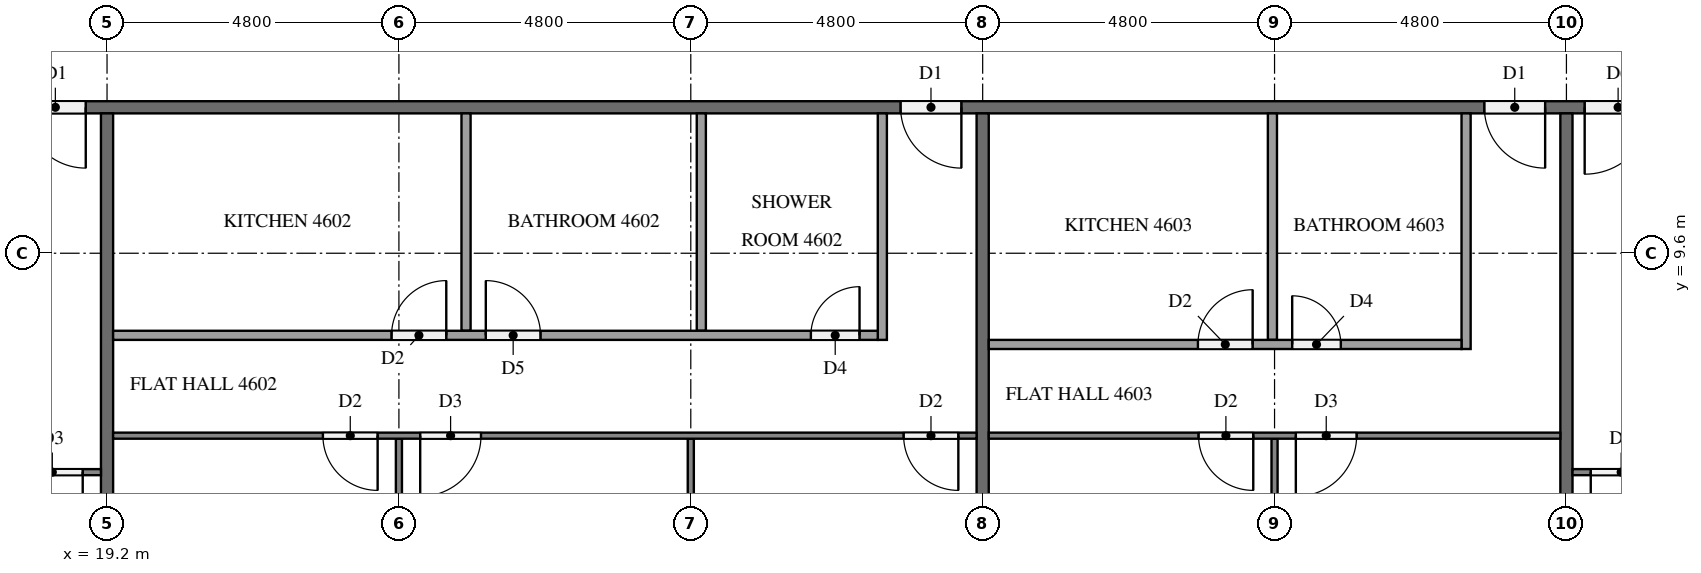
"""IFC4 building model, lengths in metres.
Left out: names, types, materials, properties, quantities, classifications, styles, units other than length and angle.
Written with IfcOpenShell. Run it as: python <this file> out.ifc"""

import sys

from ifc_helpers import new_model, si_unit, direction, frame, frame_2d, origin, place, context, subcontext, project, spatial, rectangle, extrude, element, fill, save


model = new_model("IFC4")
c1 = context("Model", 3, precision=1e-05, world=origin(), true_north=direction((0.0, 1.0)))
c2 = subcontext(c1, "Body", "Model", "MODEL_VIEW")
j1 = project(units=[si_unit("LENGTHUNIT", "METRE"), si_unit("PLANEANGLEUNIT", "RADIAN")], contexts=[c1])
p1 = place(None, origin())
s1 = spatial("IfcSite", under=j1, at=p1, CompositionType="ELEMENT")
p2 = place(p1, origin())
s2 = spatial("IfcBuilding", under=s1, at=p2, CompositionType="ELEMENT")
p3 = place(p2, frame((0.0, 0.0, 178.9)))
s3 = spatial("IfcBuildingStorey", under=s2, at=p3, CompositionType="ELEMENT", Elevation=178.9)
p4 = place(p3, frame((50.5, 12.0, 0.0), z_axis=(0.0, 0.0, 1.0), x_axis=(-1.0, 0.0, 0.0)))
e1 = element("IfcWall", 1, at=p4, inside=s3, PredefinedType="PARTITIONING", context=c2, shape_type="SweptSolid", body=[
    extrude(rectangle(XDim=38.6, YDim=0.2, at=frame_2d((19.3, 0.0))), origin(), (0.0, 0.0, 1.0), 3.2),
])
p5 = place(p4, frame((31.65, 0.0, 0.0)))
e2 = element("IfcOpeningElement", 2, at=p5, cuts=e1, PredefinedType="OPENING", context=c2, shape_type="SweptSolid", body=[
    extrude(rectangle(XDim=1.0, YDim=2.1, at=frame_2d((0.5, 1.05))), frame((0.0, 0.11, 0.0), z_axis=(0.0, -1.0, 0.0), x_axis=(1.0, 0.0, 0.0)), (0.0, 0.0, 1.0), 0.22),
])
p6 = place(p4, frame((17.25, 0.0, 0.0)))
e3 = element("IfcOpeningElement", 3, at=p6, cuts=e1, PredefinedType="OPENING", context=c2, shape_type="SweptSolid", body=[
    extrude(rectangle(XDim=1.0, YDim=2.1, at=frame_2d((0.5, 1.05))), frame((0.0, 0.11, 0.0), z_axis=(0.0, -1.0, 0.0), x_axis=(1.0, 0.0, 0.0)), (0.0, 0.0, 1.0), 0.22),
])
p7 = place(p4, frame((7.65, 0.0, 0.0)))
e4 = element("IfcOpeningElement", 4, at=p7, cuts=e1, PredefinedType="OPENING", context=c2, shape_type="SweptSolid", body=[
    extrude(rectangle(XDim=1.0, YDim=2.1, at=frame_2d((0.5, 1.05))), frame((0.0, 0.11, 0.0), z_axis=(0.0, -1.0, 0.0), x_axis=(1.0, 0.0, 0.0)), (0.0, 0.0, 1.0), 0.22),
])
p8 = place(p4, frame((5.9, 0.0, 0.0)))
e5 = element("IfcOpeningElement", 5, at=p8, cuts=e1, PredefinedType="OPENING", context=c2, shape_type="SweptSolid", body=[
    extrude(rectangle(XDim=1.1, YDim=2.1, at=frame_2d((0.55, 1.05))), frame((0.0, 0.11, 0.0), z_axis=(0.0, -1.0, 0.0), x_axis=(1.0, 0.0, 0.0)), (0.0, 0.0, 1.0), 0.22),
])
p9 = place(p3, frame((19.2, 11.9, 0.0), z_axis=(0.0, 0.0, 1.0), x_axis=(0.0, -1.0, 0.0)))
e6 = element("IfcWall", 6, at=p9, inside=s3, PredefinedType="PARTITIONING", context=c2, shape_type="SweptSolid", body=[
    extrude(rectangle(XDim=11.575, YDim=0.2, at=frame_2d((5.788, 0.0))), origin(), (0.0, 0.0, 1.0), 3.2),
])
for number, where, z_axis, x_axis in (
    (7, (33.6, 11.9, 0.0), (0.0, 0.0, 1.0), (0.0, -1.0, 0.0)),
    (8, (43.2, 11.9, 0.0), (0.0, 0.0, 1.0), (0.0, -1.0, 0.0)),
):
    element("IfcWall", number, at=place(p3, frame(where, z_axis=z_axis, x_axis=x_axis)), inside=s3, PredefinedType="PARTITIONING", context=c2, shape_type="SweptSolid", body=[
        extrude(rectangle(XDim=11.8, YDim=0.2, at=frame_2d((5.9, 0.0))), origin(), (0.0, 0.0, 1.0), 3.2),
    ])
p10 = place(p3, frame((19.1, 6.0, 0.0), z_axis=(0.0, 0.0, 1.0), x_axis=(-1.0, 0.0, 0.0)))
e9 = element("IfcWall", 9, at=p10, inside=s3, PredefinedType="PARTITIONING", context=c2, shape_type="SweptSolid", body=[
    extrude(rectangle(XDim=14.2, YDim=0.1, at=frame_2d((7.1, 0.0))), origin(), (0.0, 0.0, 1.0), 3.2),
])
p11 = place(p10, frame((0.3, 0.0, 0.0)))
e10 = element("IfcOpeningElement", 10, at=p11, cuts=e9, PredefinedType="OPENING", context=c2, shape_type="SweptSolid", body=[
    extrude(rectangle(XDim=1.0, YDim=2.1, at=frame_2d((0.5, 1.05))), frame((0.0, 0.06, 0.0), z_axis=(0.0, -1.0, 0.0), x_axis=(1.0, 0.0, 0.0)), (0.0, 0.0, 1.0), 0.12),
])
p12 = place(p10, frame((8.25, 0.0, 0.0)))
e11 = element("IfcOpeningElement", 11, at=p12, cuts=e9, PredefinedType="OPENING", context=c2, shape_type="SweptSolid", body=[
    extrude(rectangle(XDim=0.9, YDim=2.1, at=frame_2d((0.45, 1.05))), frame((0.0, 0.06, 0.0), z_axis=(0.0, -1.0, 0.0), x_axis=(1.0, 0.0, 0.0)), (0.0, 0.0, 1.0), 0.12),
])
p13 = place(p10, frame((9.85, 0.0, 0.0)))
e12 = element("IfcOpeningElement", 12, at=p13, cuts=e9, PredefinedType="OPENING", context=c2, shape_type="SweptSolid", body=[
    extrude(rectangle(XDim=0.9, YDim=2.1, at=frame_2d((0.45, 1.05))), frame((0.0, 0.06, 0.0), z_axis=(0.0, -1.0, 0.0), x_axis=(1.0, 0.0, 0.0)), (0.0, 0.0, 1.0), 0.12),
])
p14 = place(p3, frame((28.8, 6.55, 0.0), z_axis=(0.0, 0.0, 1.0), x_axis=(0.0, -1.0, 0.0)))
e13 = element("IfcWall", 13, at=p14, inside=s3, PredefinedType="PARTITIONING", context=c2, shape_type="SweptSolid", body=[
    extrude(rectangle(XDim=6.225, YDim=0.1, at=frame_2d((3.113, 0.0))), origin(), (0.0, 0.0, 1.0), 3.2),
])
p15 = place(p3, frame((24.0, 6.55, 0.0), z_axis=(0.0, 0.0, 1.0), x_axis=(0.0, -1.0, 0.0)))
e14 = element("IfcWall", 14, at=p15, inside=s3, PredefinedType="PARTITIONING", context=c2, shape_type="SweptSolid", body=[
    extrude(rectangle(XDim=6.45, YDim=0.1, at=frame_2d((3.225, 0.0))), origin(), (0.0, 0.0, 1.0), 3.2),
])
p16 = place(p3, frame((33.5, 6.6, 0.0), z_axis=(0.0, 0.0, 1.0), x_axis=(-1.0, 0.0, 0.0)))
e15 = element("IfcWall", 15, at=p16, inside=s3, PredefinedType="PARTITIONING", context=c2, shape_type="SweptSolid", body=[
    extrude(rectangle(XDim=14.2, YDim=0.1, at=frame_2d((7.1, 0.0))), origin(), (0.0, 0.0, 1.0), 3.2),
])
p17 = place(p16, frame((0.3, 0.0, 0.0)))
e16 = element("IfcOpeningElement", 16, at=p17, cuts=e15, PredefinedType="OPENING", context=c2, shape_type="SweptSolid", body=[
    extrude(rectangle(XDim=0.9, YDim=2.1, at=frame_2d((0.45, 1.05))), frame((0.0, 0.06, 0.0), z_axis=(0.0, -1.0, 0.0), x_axis=(1.0, 0.0, 0.0)), (0.0, 0.0, 1.0), 0.12),
])
p18 = place(p16, frame((8.15, 0.0, 0.0)))
e17 = element("IfcOpeningElement", 17, at=p18, cuts=e15, PredefinedType="OPENING", context=c2, shape_type="SweptSolid", body=[
    extrude(rectangle(XDim=1.0, YDim=2.1, at=frame_2d((0.5, 1.05))), frame((0.0, 0.06, 0.0), z_axis=(0.0, -1.0, 0.0), x_axis=(1.0, 0.0, 0.0)), (0.0, 0.0, 1.0), 0.12),
])
p19 = place(p16, frame((9.85, 0.0, 0.0)))
e18 = element("IfcOpeningElement", 18, at=p19, cuts=e15, PredefinedType="OPENING", context=c2, shape_type="SweptSolid", body=[
    extrude(rectangle(XDim=0.9, YDim=2.1, at=frame_2d((0.45, 1.05))), frame((0.0, 0.06, 0.0), z_axis=(0.0, -1.0, 0.0), x_axis=(1.0, 0.0, 0.0)), (0.0, 0.0, 1.0), 0.12),
])
for number, where, z_axis, x_axis in (
    (19, (28.973, 11.9, 0.0), (0.0, 0.0, 1.0), (0.0, -1.0, 0.0)),
    (20, (25.104, 11.9, 0.0), (0.0, 0.0, 1.0), (0.0, -1.0, 0.0)),
):
    element("IfcWall", number, at=place(p3, frame(where, z_axis=z_axis, x_axis=x_axis)), inside=s3, PredefinedType="PARTITIONING", context=c2, shape_type="SweptSolid", body=[
        extrude(rectangle(XDim=3.575, YDim=0.15, at=frame_2d((1.788, 0.0))), origin(), (0.0, 0.0, 1.0), 3.2),
    ])
p20 = place(p3, frame((31.95, 11.9, 0.0), z_axis=(0.0, 0.0, 1.0), x_axis=(0.0, -1.0, 0.0)))
e21 = element("IfcWall", 21, at=p20, inside=s3, PredefinedType="PARTITIONING", context=c2, shape_type="SweptSolid", body=[
    extrude(rectangle(XDim=3.725, YDim=0.15, at=frame_2d((1.862, 0.0))), origin(), (0.0, 0.0, 1.0), 3.2),
])
p21 = place(p3, frame((19.3, 8.25, 0.0), z_axis=(0.0, 0.0, 1.0), x_axis=(1.0, 0.0, 0.0)))
e22 = element("IfcWall", 22, at=p21, inside=s3, PredefinedType="PARTITIONING", context=c2, shape_type="SweptSolid", body=[
    extrude(rectangle(XDim=12.575, YDim=0.15, at=frame_2d((6.288, 0.0))), origin(), (0.0, 0.0, 1.0), 3.2),
])
p22 = place(p21, frame((11.475, 0.0, 0.0)))
e23 = element("IfcOpeningElement", 23, at=p22, cuts=e22, PredefinedType="OPENING", context=c2, shape_type="SweptSolid", body=[
    extrude(rectangle(XDim=0.8, YDim=2.1, at=frame_2d((0.4, 1.05))), frame((0.0, 0.085, 0.0), z_axis=(0.0, -1.0, 0.0), x_axis=(1.0, 0.0, 0.0)), (0.0, 0.0, 1.0), 0.17),
])
p23 = place(p21, frame((6.129, 0.0, 0.0)))
e24 = element("IfcOpeningElement", 24, at=p23, cuts=e22, PredefinedType="OPENING", context=c2, shape_type="SweptSolid", body=[
    extrude(rectangle(XDim=0.9, YDim=2.1, at=frame_2d((0.45, 1.05))), frame((0.0, 0.085, 0.0), z_axis=(0.0, -1.0, 0.0), x_axis=(1.0, 0.0, 0.0)), (0.0, 0.0, 1.0), 0.17),
])
p24 = place(p21, frame((4.579, 0.0, 0.0)))
e25 = element("IfcOpeningElement", 25, at=p24, cuts=e22, PredefinedType="OPENING", context=c2, shape_type="SweptSolid", body=[
    extrude(rectangle(XDim=0.9, YDim=2.1, at=frame_2d((0.45, 1.05))), frame((0.0, 0.085, 0.0), z_axis=(0.0, -1.0, 0.0), x_axis=(1.0, 0.0, 0.0)), (0.0, 0.0, 1.0), 0.17),
])
p25 = place(p3, frame((38.4, 6.55, 0.0), z_axis=(0.0, 0.0, 1.0), x_axis=(0.0, -1.0, 0.0)))
e26 = element("IfcWall", 26, at=p25, inside=s3, PredefinedType="PARTITIONING", context=c2, shape_type="SweptSolid", body=[
    extrude(rectangle(XDim=6.225, YDim=0.1, at=frame_2d((3.113, 0.0))), origin(), (0.0, 0.0, 1.0), 3.2),
])
p26 = place(p3, frame((43.1, 6.6, 0.0), z_axis=(0.0, 0.0, 1.0), x_axis=(-1.0, 0.0, 0.0)))
e27 = element("IfcWall", 27, at=p26, inside=s3, PredefinedType="PARTITIONING", context=c2, shape_type="SweptSolid", body=[
    extrude(rectangle(XDim=9.4, YDim=0.1, at=frame_2d((4.7, 0.0))), origin(), (0.0, 0.0, 1.0), 3.2),
])
p27 = place(p26, frame((3.35, 0.0, 0.0)))
e28 = element("IfcOpeningElement", 28, at=p27, cuts=e27, PredefinedType="OPENING", context=c2, shape_type="SweptSolid", body=[
    extrude(rectangle(XDim=1.0, YDim=2.1, at=frame_2d((0.5, 1.05))), frame((0.0, 0.06, 0.0), z_axis=(0.0, -1.0, 0.0), x_axis=(1.0, 0.0, 0.0)), (0.0, 0.0, 1.0), 0.12),
])
p28 = place(p26, frame((5.05, 0.0, 0.0)))
e29 = element("IfcOpeningElement", 29, at=p28, cuts=e27, PredefinedType="OPENING", context=c2, shape_type="SweptSolid", body=[
    extrude(rectangle(XDim=0.9, YDim=2.1, at=frame_2d((0.45, 1.05))), frame((0.0, 0.06, 0.0), z_axis=(0.0, -1.0, 0.0), x_axis=(1.0, 0.0, 0.0)), (0.0, 0.0, 1.0), 0.12),
])
p29 = place(p3, frame((38.365, 11.9, 0.0), z_axis=(0.0, 0.0, 1.0), x_axis=(0.0, -1.0, 0.0)))
e30 = element("IfcWall", 30, at=p29, inside=s3, PredefinedType="PARTITIONING", context=c2, shape_type="SweptSolid", body=[
    extrude(rectangle(XDim=3.725, YDim=0.15, at=frame_2d((1.862, 0.0))), origin(), (0.0, 0.0, 1.0), 3.2),
])
p30 = place(p3, frame((41.55, 11.9, 0.0), z_axis=(0.0, 0.0, 1.0), x_axis=(0.0, -1.0, 0.0)))
e31 = element("IfcWall", 31, at=p30, inside=s3, PredefinedType="PARTITIONING", context=c2, shape_type="SweptSolid", body=[
    extrude(rectangle(XDim=3.875, YDim=0.15, at=frame_2d((1.938, 0.0))), origin(), (0.0, 0.0, 1.0), 3.2),
])
p31 = place(p3, frame((33.7, 8.1, 0.0), z_axis=(0.0, 0.0, 1.0), x_axis=(1.0, 0.0, 0.0)))
e32 = element("IfcWall", 32, at=p31, inside=s3, PredefinedType="PARTITIONING", context=c2, shape_type="SweptSolid", body=[
    extrude(rectangle(XDim=7.775, YDim=0.15, at=frame_2d((3.888, 0.0))), origin(), (0.0, 0.0, 1.0), 3.2),
])
p32 = place(p31, frame((4.99, 0.0, 0.0)))
e33 = element("IfcOpeningElement", 33, at=p32, cuts=e32, PredefinedType="OPENING", context=c2, shape_type="SweptSolid", body=[
    extrude(rectangle(XDim=0.8, YDim=2.1, at=frame_2d((0.4, 1.05))), frame((0.0, 0.085, 0.0), z_axis=(0.0, -1.0, 0.0), x_axis=(1.0, 0.0, 0.0)), (0.0, 0.0, 1.0), 0.17),
])
p33 = place(p31, frame((3.44, 0.0, 0.0)))
e34 = element("IfcOpeningElement", 34, at=p33, cuts=e32, PredefinedType="OPENING", context=c2, shape_type="SweptSolid", body=[
    extrude(rectangle(XDim=0.9, YDim=2.1, at=frame_2d((0.45, 1.05))), frame((0.0, 0.085, 0.0), z_axis=(0.0, -1.0, 0.0), x_axis=(1.0, 0.0, 0.0)), (0.0, 0.0, 1.0), 0.17),
])
p34 = place(p3, frame((62.3, 6.0, 0.0), z_axis=(0.0, 0.0, 1.0), x_axis=(-1.0, 0.0, 0.0)))
e35 = element("IfcWall", 35, at=p34, inside=s3, PredefinedType="PARTITIONING", context=c2, shape_type="SweptSolid", body=[
    extrude(rectangle(XDim=19.0, YDim=0.1, at=frame_2d((9.5, 0.0))), origin(), (0.0, 0.0, 1.0), 3.2),
])
p35 = place(p34, frame((17.7, 0.0, 0.0)))
e36 = element("IfcOpeningElement", 36, at=p35, cuts=e35, PredefinedType="OPENING", context=c2, shape_type="SweptSolid", body=[
    extrude(rectangle(XDim=1.0, YDim=2.1, at=frame_2d((0.5, 1.05))), frame((0.0, 0.06, 0.0), z_axis=(0.0, -1.0, 0.0), x_axis=(1.0, 0.0, 0.0)), (0.0, 0.0, 1.0), 0.12),
])
p36 = place(p34, frame((9.85, 0.0, 0.0)))
e37 = element("IfcOpeningElement", 37, at=p36, cuts=e35, PredefinedType="OPENING", context=c2, shape_type="SweptSolid", body=[
    extrude(rectangle(XDim=0.9, YDim=2.1, at=frame_2d((0.45, 1.05))), frame((0.0, 0.06, 0.0), z_axis=(0.0, -1.0, 0.0), x_axis=(1.0, 0.0, 0.0)), (0.0, 0.0, 1.0), 0.12),
])
p37 = place(p34, frame((8.25, 0.0, 0.0)))
e38 = element("IfcOpeningElement", 38, at=p37, cuts=e35, PredefinedType="OPENING", context=c2, shape_type="SweptSolid", body=[
    extrude(rectangle(XDim=0.9, YDim=2.1, at=frame_2d((0.45, 1.05))), frame((0.0, 0.06, 0.0), z_axis=(0.0, -1.0, 0.0), x_axis=(1.0, 0.0, 0.0)), (0.0, 0.0, 1.0), 0.12),
])
p38 = place(p34, frame((0.4, 0.0, 0.0)))
e39 = element("IfcOpeningElement", 39, at=p38, cuts=e35, PredefinedType="OPENING", context=c2, shape_type="SweptSolid", body=[
    extrude(rectangle(XDim=0.9, YDim=2.1, at=frame_2d((0.45, 1.05))), frame((0.0, 0.06, 0.0), z_axis=(0.0, -1.0, 0.0), x_axis=(1.0, 0.0, 0.0)), (0.0, 0.0, 1.0), 0.12),
])
p39 = place(p5, origin())
e40 = element("IfcDoor", 40, at=p39, inside=s3, OperationType="SINGLE_SWING_LEFT", PredefinedType="DOOR", context=c2, shape_type="SweptSolid", body=[
    extrude(rectangle(XDim=1.0, YDim=2.1, at=frame_2d((0.5, 1.05))), frame((0.0, 0.025, 0.0), z_axis=(0.0, -1.0, 0.0), x_axis=(1.0, 0.0, 0.0)), (0.0, 0.0, 1.0), 0.05),
])
fill(e2, e40)
p40 = place(p6, origin())
e41 = element("IfcDoor", 41, at=p40, inside=s3, OperationType="SINGLE_SWING_LEFT", PredefinedType="DOOR", context=c2, shape_type="SweptSolid", body=[
    extrude(rectangle(XDim=1.0, YDim=2.1, at=frame_2d((0.5, 1.05))), frame((0.0, 0.025, 0.0), z_axis=(0.0, -1.0, 0.0), x_axis=(1.0, 0.0, 0.0)), (0.0, 0.0, 1.0), 0.05),
])
fill(e3, e41)
p41 = place(p7, origin())
e42 = element("IfcDoor", 42, at=p41, inside=s3, OperationType="SINGLE_SWING_LEFT", PredefinedType="DOOR", context=c2, shape_type="SweptSolid", body=[
    extrude(rectangle(XDim=1.0, YDim=2.1, at=frame_2d((0.5, 1.05))), frame((0.0, 0.025, 0.0), z_axis=(0.0, -1.0, 0.0), x_axis=(1.0, 0.0, 0.0)), (0.0, 0.0, 1.0), 0.05),
])
fill(e4, e42)
p42 = place(p8, origin())
e43 = element("IfcDoor", 43, at=p42, inside=s3, OperationType="SINGLE_SWING_RIGHT", PredefinedType="DOOR", context=c2, shape_type="SweptSolid", body=[
    extrude(rectangle(XDim=1.1, YDim=2.1, at=frame_2d((0.55, 1.05))), frame((0.0, 0.025, 0.0), z_axis=(0.0, -1.0, 0.0), x_axis=(1.0, 0.0, 0.0)), (0.0, 0.0, 1.0), 0.05),
])
fill(e5, e43)
p43 = place(p11, origin())
e44 = element("IfcDoor", 44, at=p43, inside=s3, OperationType="SINGLE_SWING_LEFT", PredefinedType="DOOR", context=c2, shape_type="SweptSolid", body=[
    extrude(rectangle(XDim=1.0, YDim=2.1, at=frame_2d((0.5, 1.05))), frame((0.0, 0.025, 0.0), z_axis=(0.0, -1.0, 0.0), x_axis=(1.0, 0.0, 0.0)), (0.0, 0.0, 1.0), 0.05),
])
fill(e10, e44)
p44 = place(p17, origin())
e45 = element("IfcDoor", 45, at=p44, inside=s3, OperationType="SINGLE_SWING_LEFT", PredefinedType="DOOR", context=c2, shape_type="SweptSolid", body=[
    extrude(rectangle(XDim=0.9, YDim=2.1, at=frame_2d((0.45, 1.05))), frame((0.0, 0.025, 0.0), z_axis=(0.0, -1.0, 0.0), x_axis=(1.0, 0.0, 0.0)), (0.0, 0.0, 1.0), 0.05),
])
fill(e16, e45)
p45 = place(p18, origin())
e46 = element("IfcDoor", 46, at=p45, inside=s3, OperationType="SINGLE_SWING_RIGHT", PredefinedType="DOOR", context=c2, shape_type="SweptSolid", body=[
    extrude(rectangle(XDim=1.0, YDim=2.1, at=frame_2d((0.5, 1.05))), frame((0.0, 0.025, 0.0), z_axis=(0.0, -1.0, 0.0), x_axis=(1.0, 0.0, 0.0)), (0.0, 0.0, 1.0), 0.05),
])
fill(e17, e46)
p46 = place(p19, origin())
e47 = element("IfcDoor", 47, at=p46, inside=s3, OperationType="SINGLE_SWING_LEFT", PredefinedType="DOOR", context=c2, shape_type="SweptSolid", body=[
    extrude(rectangle(XDim=0.9, YDim=2.1, at=frame_2d((0.45, 1.05))), frame((0.0, 0.025, 0.0), z_axis=(0.0, -1.0, 0.0), x_axis=(1.0, 0.0, 0.0)), (0.0, 0.0, 1.0), 0.05),
])
fill(e18, e47)
p47 = place(p22, origin())
e48 = element("IfcDoor", 48, at=p47, inside=s3, OperationType="SINGLE_SWING_RIGHT", PredefinedType="DOOR", context=c2, shape_type="SweptSolid", body=[
    extrude(rectangle(XDim=0.8, YDim=2.1, at=frame_2d((0.4, 1.05))), frame((0.0, 0.025, 0.0), z_axis=(0.0, -1.0, 0.0), x_axis=(1.0, 0.0, 0.0)), (0.0, 0.0, 1.0), 0.05),
])
fill(e23, e48)
p48 = place(p23, origin())
e49 = element("IfcDoor", 49, at=p48, inside=s3, OperationType="SINGLE_SWING_LEFT", PredefinedType="DOOR", context=c2, shape_type="SweptSolid", body=[
    extrude(rectangle(XDim=0.9, YDim=2.1, at=frame_2d((0.45, 1.05))), frame((0.0, 0.025, 0.0), z_axis=(0.0, -1.0, 0.0), x_axis=(1.0, 0.0, 0.0)), (0.0, 0.0, 1.0), 0.05),
])
fill(e24, e49)
p49 = place(p24, origin())
e50 = element("IfcDoor", 50, at=p49, inside=s3, OperationType="SINGLE_SWING_RIGHT", PredefinedType="DOOR", context=c2, shape_type="SweptSolid", body=[
    extrude(rectangle(XDim=0.9, YDim=2.1, at=frame_2d((0.45, 1.05))), frame((0.0, 0.025, 0.0), z_axis=(0.0, -1.0, 0.0), x_axis=(1.0, 0.0, 0.0)), (0.0, 0.0, 1.0), 0.05),
])
fill(e25, e50)
p50 = place(p27, origin())
e51 = element("IfcDoor", 51, at=p50, inside=s3, OperationType="SINGLE_SWING_RIGHT", PredefinedType="DOOR", context=c2, shape_type="SweptSolid", body=[
    extrude(rectangle(XDim=1.0, YDim=2.1, at=frame_2d((0.5, 1.05))), frame((0.0, 0.025, 0.0), z_axis=(0.0, -1.0, 0.0), x_axis=(1.0, 0.0, 0.0)), (0.0, 0.0, 1.0), 0.05),
])
fill(e28, e51)
p51 = place(p28, origin())
e52 = element("IfcDoor", 52, at=p51, inside=s3, OperationType="SINGLE_SWING_LEFT", PredefinedType="DOOR", context=c2, shape_type="SweptSolid", body=[
    extrude(rectangle(XDim=0.9, YDim=2.1, at=frame_2d((0.45, 1.05))), frame((0.0, 0.025, 0.0), z_axis=(0.0, -1.0, 0.0), x_axis=(1.0, 0.0, 0.0)), (0.0, 0.0, 1.0), 0.05),
])
fill(e29, e52)
p52 = place(p32, origin())
e53 = element("IfcDoor", 53, at=p52, inside=s3, OperationType="SINGLE_SWING_LEFT", PredefinedType="DOOR", context=c2, shape_type="SweptSolid", body=[
    extrude(rectangle(XDim=0.8, YDim=2.1, at=frame_2d((0.4, 1.05))), frame((0.0, 0.025, 0.0), z_axis=(0.0, -1.0, 0.0), x_axis=(1.0, 0.0, 0.0)), (0.0, 0.0, 1.0), 0.05),
])
fill(e33, e53)
p53 = place(p33, origin())
e54 = element("IfcDoor", 54, at=p53, inside=s3, OperationType="SINGLE_SWING_RIGHT", PredefinedType="DOOR", context=c2, shape_type="SweptSolid", body=[
    extrude(rectangle(XDim=0.9, YDim=2.1, at=frame_2d((0.45, 1.05))), frame((0.0, 0.025, 0.0), z_axis=(0.0, -1.0, 0.0), x_axis=(1.0, 0.0, 0.0)), (0.0, 0.0, 1.0), 0.05),
])
fill(e34, e54)
p54 = place(p35, origin())
e55 = element("IfcDoor", 55, at=p54, inside=s3, OperationType="SINGLE_SWING_RIGHT", PredefinedType="DOOR", context=c2, shape_type="SweptSolid", body=[
    extrude(rectangle(XDim=1.0, YDim=2.1, at=frame_2d((0.5, 1.05))), frame((0.0, 0.025, 0.0), z_axis=(0.0, -1.0, 0.0), x_axis=(1.0, 0.0, 0.0)), (0.0, 0.0, 1.0), 0.05),
])
fill(e36, e55)
save(model, sys.argv[1])
